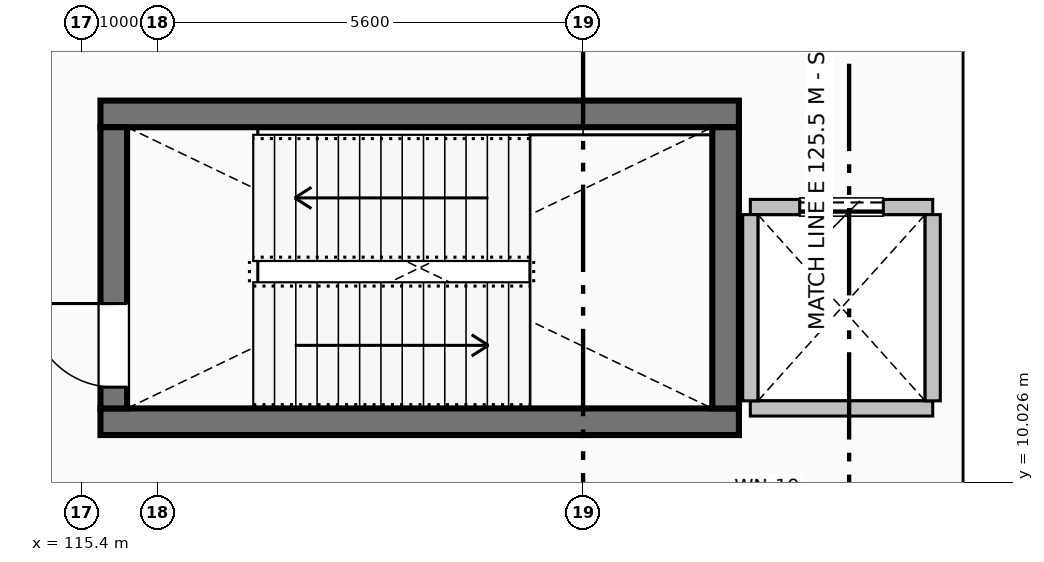
"""IFC4 building model, lengths in metres.
Left out: names, types, materials, properties, quantities, classifications, styles, units other than length and angle.
Written with IfcOpenShell. Run it as: python <this file> out.ifc"""

import sys

from ifc_helpers import new_model, si_unit, direction, frame, frame_2d, origin, place, context, subcontext, project, spatial, rectangle, extrude, element, fill, save


model = new_model("IFC4")
c1 = context("Model", 3, precision=1e-05, world=origin(), true_north=direction((0.0, 1.0)))
c2 = subcontext(c1, "Body", "Model", "MODEL_VIEW")
j1 = project(units=[si_unit("LENGTHUNIT", "METRE"), si_unit("PLANEANGLEUNIT", "RADIAN")], contexts=[c1])
p1 = place(None, origin())
s1 = spatial("IfcSite", under=j1, at=p1, CompositionType="ELEMENT")
p2 = place(p1, origin())
s2 = spatial("IfcBuilding", under=s1, at=p2, CompositionType="ELEMENT")
p3 = place(p2, frame((0.0, 0.0, 10.2)))
s3 = spatial("IfcBuildingStorey", under=s2, at=p3, CompositionType="ELEMENT", Elevation=10.2)
for number, where, z_axis, x_axis in (
    (1, (115.65, 10.825, 0.0), (0.0, 0.0, 1.0), (1.0, 0.0, 0.0)),
    (2, (124.05, 14.875, 0.0), (0.0, 0.0, 1.0), (-1.0, 0.0, 0.0)),
):
    element("IfcWall", number, at=place(p3, frame(where, z_axis=z_axis, x_axis=x_axis)), inside=s3, PredefinedType="SHEAR", context=c2, shape_type="SweptSolid", body=[
        extrude(rectangle(XDim=8.4, YDim=0.35, at=frame_2d((4.2, 0.0))), origin(), (0.0, 0.0, 1.0), 4.5),
    ])
p4 = place(p3, frame((115.825, 11.0, 0.0), z_axis=(0.0, 0.0, 1.0), x_axis=(0.0, 1.0, 0.0)))
e3 = element("IfcWall", 3, at=p4, inside=s3, PredefinedType="SHEAR", context=c2, shape_type="SweptSolid", body=[
    extrude(rectangle(XDim=3.7, YDim=0.35, at=frame_2d((1.85, 0.0))), origin(), (0.0, 0.0, 1.0), 4.5),
])
p5 = place(p4, frame((0.28, 0.0, 0.0)))
e4 = element("IfcOpeningElement", 4, at=p5, cuts=e3, PredefinedType="OPENING", context=c2, shape_type="SweptSolid", body=[
    extrude(rectangle(XDim=1.1, YDim=2.08, at=frame_2d((0.55, 1.04))), frame((0.0, 0.185, 0.0), z_axis=(0.0, -1.0, 0.0), x_axis=(1.0, 0.0, 0.0)), (0.0, 0.0, 1.0), 0.37),
])
p6 = place(p3, frame((123.875, 14.7, 0.0), z_axis=(0.0, 0.0, 1.0), x_axis=(0.0, -1.0, 0.0)))
e5 = element("IfcWall", 5, at=p6, inside=s3, PredefinedType="SHEAR", context=c2, shape_type="SweptSolid", body=[
    extrude(rectangle(XDim=3.7, YDim=0.35, at=frame_2d((1.85, 0.0))), origin(), (0.0, 0.0, 1.0), 4.5),
])
p7 = place(p3, frame((124.2, 11.0, 0.0), z_axis=(0.0, 0.0, 1.0), x_axis=(1.0, 0.0, 0.0)))
e6 = element("IfcWall", 6, at=p7, inside=s3, PredefinedType="PARTITIONING", context=c2, shape_type="SweptSolid", body=[
    extrude(rectangle(XDim=2.4, YDim=0.2, at=frame_2d((1.2, 0.0))), origin(), (0.0, 0.0, 1.0), 4.492),
])
p8 = place(p3, frame((126.6, 13.65, 0.0), z_axis=(0.0, 0.0, 1.0), x_axis=(-1.0, 0.0, 0.0)))
e7 = element("IfcWall", 7, at=p8, inside=s3, PredefinedType="PARTITIONING", context=c2, shape_type="SweptSolid", body=[
    extrude(rectangle(XDim=2.4, YDim=0.2, at=frame_2d((1.2, 0.0))), origin(), (0.0, 0.0, 1.0), 4.492),
])
p9 = place(p8, frame((0.65, 0.0, 0.0)))
e8 = element("IfcOpeningElement", 8, at=p9, cuts=e7, PredefinedType="OPENING", context=c2, shape_type="SweptSolid", body=[
    extrude(rectangle(XDim=1.1, YDim=2.15, at=frame_2d((0.55, 1.075))), frame((0.0, 0.11, 0.0), z_axis=(0.0, -1.0, 0.0), x_axis=(1.0, 0.0, 0.0)), (0.0, 0.0, 1.0), 0.22),
])
for number, where, z_axis, x_axis in (
    (9, (124.2, 11.1, 0.0), (0.0, 0.0, 1.0), (0.0, 1.0, 0.0)),
    (10, (126.6, 13.55, 0.0), (0.0, 0.0, 1.0), (0.0, -1.0, 0.0)),
):
    element("IfcWall", number, at=place(p3, frame(where, z_axis=z_axis, x_axis=x_axis)), inside=s3, PredefinedType="PARTITIONING", context=c2, shape_type="SweptSolid", body=[
        extrude(rectangle(XDim=2.45, YDim=0.2, at=frame_2d((1.225, 0.0))), origin(), (0.0, 0.0, 1.0), 4.492),
    ])
p10 = place(p5, origin())
e11 = element("IfcDoor", 11, at=p10, inside=s3, OperationType="SINGLE_SWING_RIGHT", PredefinedType="DOOR", context=c2, shape_type="SweptSolid", body=[
    extrude(rectangle(XDim=1.1, YDim=2.08, at=frame_2d((0.55, 1.04))), frame((0.0, 0.025, 0.0), z_axis=(0.0, -1.0, 0.0), x_axis=(1.0, 0.0, 0.0)), (0.0, 0.0, 1.0), 0.05),
])
fill(e4, e11)
p11 = place(p9, origin())
e12 = element("IfcDoor", 12, at=p11, inside=s3, OperationType="SLIDING_TO_LEFT", PredefinedType="DOOR", context=c2, shape_type="SweptSolid", body=[
    extrude(rectangle(XDim=1.1, YDim=2.15, at=frame_2d((0.55, 1.075))), frame((0.0, 0.025, 0.0), z_axis=(0.0, -1.0, 0.0), x_axis=(1.0, 0.0, 0.0)), (0.0, 0.0, 1.0), 0.05),
])
fill(e8, e12)
save(model, sys.argv[1])
